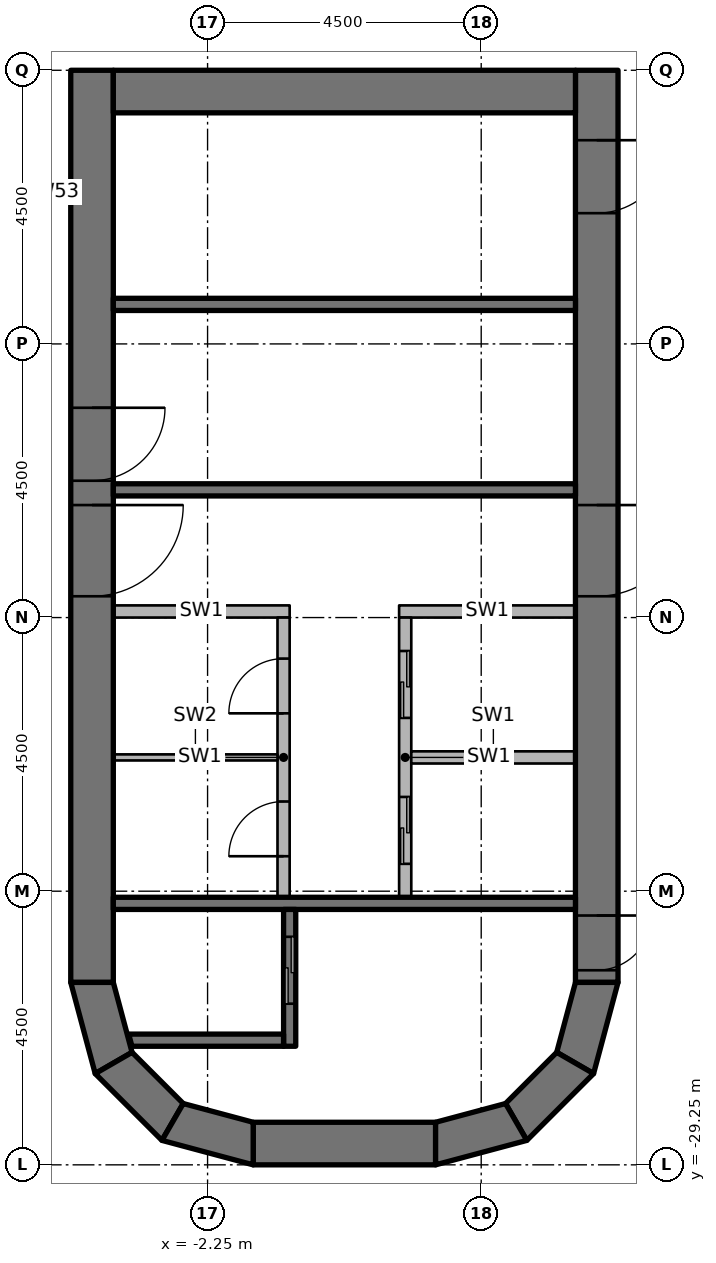
"""IFC4 building model, lengths in metres.
Left out: names, types, materials, properties, quantities, classifications, styles, units other than length and angle.
Written with IfcOpenShell. Run it as: python <this file> out.ifc"""

import sys

from ifc_helpers import new_model, si_unit, direction, frame, frame_2d, origin, place, context, subcontext, project, spatial, polyline, rectangle, outline, extrude, element, fill, save


model = new_model("IFC4")
c1 = context("Model", 3, precision=1e-05, world=origin(), true_north=direction((0.0, 1.0)))
c2 = subcontext(c1, "Body", "Model", "MODEL_VIEW")
j1 = project(units=[si_unit("LENGTHUNIT", "METRE"), si_unit("PLANEANGLEUNIT", "RADIAN")], contexts=[c1])
p1 = place(None, origin())
s1 = spatial("IfcSite", under=j1, at=p1, CompositionType="ELEMENT")
p2 = place(p1, origin())
s2 = spatial("IfcBuilding", under=s1, at=p2, CompositionType="ELEMENT")
p3 = place(p2, frame((0.0, 0.0, 190.4)))
s3 = spatial("IfcBuildingStorey", under=s2, at=p3, CompositionType="ELEMENT", Elevation=190.4)
p4 = place(p3, frame((-4.15, -11.25, 0.0), z_axis=(0.0, 0.0, 1.0), x_axis=(0.0, -1.0, 0.0)))
e1 = element("IfcWall", 1, at=p4, inside=s3, PredefinedType="SHEAR", context=c2, shape_type="SweptSolid", body=[
    extrude(rectangle(XDim=15.0, YDim=0.7, at=frame_2d((7.5, 0.0))), origin(), (0.0, 0.0, 1.0), 5.0),
])
p5 = place(p4, frame((7.15, 0.0, 0.0)))
e2 = element("IfcOpeningElement", 2, at=p5, cuts=e1, PredefinedType="OPENING", context=c2, shape_type="SweptSolid", body=[
    extrude(rectangle(XDim=1.5, YDim=2.3, at=frame_2d((0.75, 1.15))), frame((0.0, 0.36, 0.0), z_axis=(0.0, -1.0, 0.0), x_axis=(1.0, 0.0, 0.0)), (0.0, 0.0, 1.0), 0.72),
])
p6 = place(p4, frame((5.55, 0.0, 0.0)))
e3 = element("IfcOpeningElement", 3, at=p6, cuts=e1, PredefinedType="OPENING", context=c2, shape_type="SweptSolid", body=[
    extrude(rectangle(XDim=1.2, YDim=2.1, at=frame_2d((0.6, 1.05))), frame((0.0, 0.36, 0.0), z_axis=(0.0, -1.0, 0.0), x_axis=(1.0, 0.0, 0.0)), (0.0, 0.0, 1.0), 0.72),
])
p7 = place(p3, frame((4.15, -11.25, 0.0), z_axis=(0.0, 0.0, 1.0), x_axis=(0.0, -1.0, 0.0)))
e4 = element("IfcWall", 4, at=p7, inside=s3, PredefinedType="SHEAR", context=c2, shape_type="SweptSolid", body=[
    extrude(rectangle(XDim=15.0, YDim=0.7, at=frame_2d((7.5, 0.0))), origin(), (0.0, 0.0, 1.0), 5.0),
])
p8 = place(p7, frame((7.15, 0.0, 0.0)))
e5 = element("IfcOpeningElement", 5, at=p8, cuts=e4, PredefinedType="OPENING", context=c2, shape_type="SweptSolid", body=[
    extrude(rectangle(XDim=1.5, YDim=2.3, at=frame_2d((0.75, 1.15))), frame((0.0, 0.36, 0.0), z_axis=(0.0, -1.0, 0.0), x_axis=(1.0, 0.0, 0.0)), (0.0, 0.0, 1.0), 0.72),
])
p9 = place(p7, frame((13.9, 0.0, 0.0)))
e6 = element("IfcOpeningElement", 6, at=p9, cuts=e4, PredefinedType="OPENING", context=c2, shape_type="SweptSolid", body=[
    extrude(rectangle(XDim=0.9, YDim=2.1, at=frame_2d((0.45, 1.05))), frame((0.0, 0.36, 0.0), z_axis=(0.0, -1.0, 0.0), x_axis=(1.0, 0.0, 0.0)), (0.0, 0.0, 1.0), 0.72),
])
p10 = place(p7, frame((1.15, 0.0, 0.0)))
e7 = element("IfcOpeningElement", 7, at=p10, cuts=e4, PredefinedType="OPENING", context=c2, shape_type="SweptSolid", body=[
    extrude(rectangle(XDim=1.2, YDim=2.1, at=frame_2d((0.6, 1.05))), frame((0.0, 0.36, 0.0), z_axis=(0.0, -1.0, 0.0), x_axis=(1.0, 0.0, 0.0)), (0.0, 0.0, 1.0), 0.72),
])
p11 = place(p3, frame((-3.8, -11.6, 0.0), z_axis=(0.0, 0.0, 1.0), x_axis=(1.0, 0.0, 0.0)))
e8 = element("IfcWall", 8, at=p11, inside=s3, PredefinedType="SHEAR", context=c2, shape_type="SweptSolid", body=[
    extrude(rectangle(XDim=7.6, YDim=0.7, at=frame_2d((3.8, 0.0))), origin(), (0.0, 0.0, 1.0), 5.0),
])
p12 = place(p3, frame((-1.5, -28.9, 0.0), z_axis=(0.0, 0.0, 1.0), x_axis=(1.0, 0.0, 0.0)))
e9 = element("IfcWall", 9, at=p12, inside=s3, PredefinedType="SHEAR", context=c2, shape_type="SweptSolid", body=[
    extrude(rectangle(XDim=3.0, YDim=0.7, at=frame_2d((1.5, 0.0))), origin(), (0.0, 0.0, 1.0), 5.0),
])
p13 = place(p3, origin())
e10 = element("IfcWall", 10, at=p13, inside=s3, PredefinedType="SHEAR", context=c2, shape_type="SweptSolid", body=[
    extrude(outline(polyline([(-4.5, -26.25), (-4.098, -27.75), (-3.492, -27.4), (-3.8, -26.25), (-4.5, -26.25)])), origin(), (0.0, 0.0, 1.0), 5.0),
])
p14 = place(p3, origin())
e11 = element("IfcWall", 11, at=p14, inside=s3, PredefinedType="SHEAR", context=c2, shape_type="SweptSolid", body=[
    extrude(outline(polyline([(-4.098, -27.75), (-3.0, -28.848), (-2.65, -28.242), (-3.492, -27.4), (-4.098, -27.75)])), origin(), (0.0, 0.0, 1.0), 5.0),
])
p15 = place(p3, origin())
e12 = element("IfcWall", 12, at=p15, inside=s3, PredefinedType="SHEAR", context=c2, shape_type="SweptSolid", body=[
    extrude(outline(polyline([(-3.0, -28.848), (-1.5, -29.25), (-1.5, -28.55), (-2.65, -28.242), (-3.0, -28.848)])), origin(), (0.0, 0.0, 1.0), 5.0),
])
p16 = place(p3, origin())
e13 = element("IfcWall", 13, at=p16, inside=s3, PredefinedType="SHEAR", context=c2, shape_type="SweptSolid", body=[
    extrude(outline(polyline([(4.5, -26.25), (4.098, -27.75), (3.492, -27.4), (3.8, -26.25), (4.5, -26.25)])), origin(), (0.0, 0.0, 1.0), 5.0),
])
p17 = place(p3, origin())
e14 = element("IfcWall", 14, at=p17, inside=s3, PredefinedType="SHEAR", context=c2, shape_type="SweptSolid", body=[
    extrude(outline(polyline([(4.098, -27.75), (3.0, -28.848), (2.65, -28.242), (3.492, -27.4), (4.098, -27.75)])), origin(), (0.0, 0.0, 1.0), 5.0),
])
p18 = place(p3, origin())
e15 = element("IfcWall", 15, at=p18, inside=s3, PredefinedType="SHEAR", context=c2, shape_type="SweptSolid", body=[
    extrude(outline(polyline([(3.0, -28.848), (1.5, -29.25), (1.5, -28.55), (2.65, -28.242), (3.0, -28.848)])), origin(), (0.0, 0.0, 1.0), 5.0),
])
p19 = place(p3, origin())
e16 = element("IfcWall", 16, at=p19, inside=s3, PredefinedType="SOLIDWALL", context=c2, shape_type="SweptSolid", body=[
    extrude(outline(polyline([(4.49, -30.879), (6.129, -29.24), (5.95, -29.136), (4.386, -30.7), (4.49, -30.879)])), origin(), (0.0, 0.0, 1.0), 4.85),
])
p20 = place(p3, origin())
e17 = element("IfcWall", 17, at=p20, inside=s3, PredefinedType="SOLIDWALL", context=c2, shape_type="SweptSolid", body=[
    extrude(outline(polyline([(-6.129, -29.24), (-4.49, -30.879), (-4.386, -30.7), (-5.95, -29.136), (-6.129, -29.24)])), origin(), (0.0, 0.0, 1.0), 4.85),
])
p21 = place(p3, frame((3.8, -24.95, 0.0), z_axis=(0.0, 0.0, 1.0), x_axis=(-1.0, 0.0, 0.0)))
e18 = element("IfcWall", 18, at=p21, inside=s3, PredefinedType="SHEAR", context=c2, shape_type="SweptSolid", body=[
    extrude(rectangle(XDim=7.6, YDim=0.2, at=frame_2d((3.8, 0.0))), origin(), (0.0, 0.0, 1.0), 4.85),
])
p22 = place(p3, frame((-0.9, -27.3, 0.0), z_axis=(0.0, 0.0, 1.0), x_axis=(0.0, 1.0, 0.0)))
e19 = element("IfcWall", 19, at=p22, inside=s3, PredefinedType="SHEAR", context=c2, shape_type="SweptSolid", body=[
    extrude(rectangle(XDim=2.25, YDim=0.2, at=frame_2d((1.125, 0.0))), origin(), (0.0, 0.0, 1.0), 4.85),
])
p23 = place(p22, frame((0.7, 0.0, 0.0)))
e20 = element("IfcOpeningElement", 20, at=p23, cuts=e19, PredefinedType="OPENING", context=c2, shape_type="SweptSolid", body=[
    extrude(rectangle(XDim=1.1, YDim=2.3, at=frame_2d((0.55, 1.15))), frame((0.0, 0.11, 0.0), z_axis=(0.0, -1.0, 0.0), x_axis=(1.0, 0.0, 0.0)), (0.0, 0.0, 1.0), 0.22),
])
p24 = place(p3, origin())
e21 = element("IfcWall", 21, at=p24, inside=s3, PredefinedType="SHEAR", context=c2, shape_type="SweptSolid", body=[
    extrude(outline(polyline([(-1.0, -27.1), (-3.548, -27.1), (-3.494, -27.3), (-1.0, -27.3), (-1.0, -27.1)])), origin(), (0.0, 0.0, 1.0), 4.85),
])
for number, where, z_axis, x_axis in (
    (22, (3.8, -18.15, 0.0), (0.0, 0.0, 1.0), (-1.0, 0.0, 0.0)),
    (23, (3.8, -15.1, 0.0), (0.0, 0.0, 1.0), (-1.0, 0.0, 0.0)),
):
    element("IfcWall", number, at=place(p3, frame(where, z_axis=z_axis, x_axis=x_axis)), inside=s3, PredefinedType="SHEAR", context=c2, shape_type="SweptSolid", body=[
        extrude(rectangle(XDim=7.6, YDim=0.2, at=frame_2d((3.8, 0.0))), origin(), (0.0, 0.0, 1.0), 4.85),
    ])
p25 = place(p3, frame((3.8, -20.15, 0.0), z_axis=(0.0, 0.0, 1.0), x_axis=(-1.0, 0.0, 0.0)))
e24 = element("IfcWall", 24, at=p25, inside=s3, PredefinedType="PARTITIONING", context=c2, shape_type="SweptSolid", body=[
    extrude(rectangle(XDim=2.9, YDim=0.2, at=frame_2d((1.45, 0.0))), origin(), (0.0, 0.0, 1.0), 4.85),
])
p26 = place(p3, frame((1.0, -24.85, 0.0), z_axis=(0.0, 0.0, 1.0), x_axis=(0.0, 1.0, 0.0)))
e25 = element("IfcWall", 25, at=p26, inside=s3, PredefinedType="PARTITIONING", context=c2, shape_type="SweptSolid", body=[
    extrude(rectangle(XDim=4.6, YDim=0.2, at=frame_2d((2.3, 0.0))), origin(), (0.0, 0.0, 1.0), 4.85),
])
p27 = place(p26, frame((0.55, 0.0, 0.0)))
e26 = element("IfcOpeningElement", 26, at=p27, cuts=e25, PredefinedType="OPENING", context=c2, shape_type="SweptSolid", body=[
    extrude(rectangle(XDim=1.1, YDim=2.3, at=frame_2d((0.55, 1.15))), frame((0.0, 0.11, 0.0), z_axis=(0.0, -1.0, 0.0), x_axis=(1.0, 0.0, 0.0)), (0.0, 0.0, 1.0), 0.22),
])
p28 = place(p26, frame((2.95, 0.0, 0.0)))
e27 = element("IfcOpeningElement", 27, at=p28, cuts=e25, PredefinedType="OPENING", context=c2, shape_type="SweptSolid", body=[
    extrude(rectangle(XDim=1.1, YDim=2.3, at=frame_2d((0.55, 1.15))), frame((0.0, 0.11, 0.0), z_axis=(0.0, -1.0, 0.0), x_axis=(1.0, 0.0, 0.0)), (0.0, 0.0, 1.0), 0.22),
])
p29 = place(p3, frame((-0.9, -20.15, 0.0), z_axis=(0.0, 0.0, 1.0), x_axis=(-1.0, 0.0, 0.0)))
e28 = element("IfcWall", 28, at=p29, inside=s3, PredefinedType="PARTITIONING", context=c2, shape_type="SweptSolid", body=[
    extrude(rectangle(XDim=2.9, YDim=0.2, at=frame_2d((1.45, 0.0))), origin(), (0.0, 0.0, 1.0), 4.85),
])
p30 = place(p3, frame((-1.0, -24.85, 0.0), z_axis=(0.0, 0.0, 1.0), x_axis=(0.0, 1.0, 0.0)))
e29 = element("IfcWall", 29, at=p30, inside=s3, PredefinedType="PARTITIONING", context=c2, shape_type="SweptSolid", body=[
    extrude(rectangle(XDim=4.6, YDim=0.2, at=frame_2d((2.3, 0.0))), origin(), (0.0, 0.0, 1.0), 4.85),
])
p31 = place(p30, frame((0.675, 0.0, 0.0)))
e30 = element("IfcOpeningElement", 30, at=p31, cuts=e29, PredefinedType="OPENING", context=c2, shape_type="SweptSolid", body=[
    extrude(rectangle(XDim=0.9, YDim=2.1, at=frame_2d((0.45, 1.05))), frame((0.0, 0.11, 0.0), z_axis=(0.0, -1.0, 0.0), x_axis=(1.0, 0.0, 0.0)), (0.0, 0.0, 1.0), 0.22),
])
p32 = place(p30, frame((3.025, 0.0, 0.0)))
e31 = element("IfcOpeningElement", 31, at=p32, cuts=e29, PredefinedType="OPENING", context=c2, shape_type="SweptSolid", body=[
    extrude(rectangle(XDim=0.9, YDim=2.1, at=frame_2d((0.45, 1.05))), frame((0.0, 0.11, 0.0), z_axis=(0.0, -1.0, 0.0), x_axis=(1.0, 0.0, 0.0)), (0.0, 0.0, 1.0), 0.22),
])
p33 = place(p3, frame((3.8, -22.55, 0.0), z_axis=(0.0, 0.0, 1.0), x_axis=(-1.0, 0.0, 0.0)))
e32 = element("IfcWall", 32, at=p33, inside=s3, PredefinedType="PARTITIONING", context=c2, shape_type="SweptSolid", body=[
    extrude(rectangle(XDim=2.7, YDim=0.2, at=frame_2d((1.35, 0.0))), origin(), (0.0, 0.0, 1.0), 4.85),
])
p34 = place(p3, frame((-1.1, -22.55, 0.0), z_axis=(0.0, 0.0, 1.0), x_axis=(-1.0, 0.0, 0.0)))
e33 = element("IfcWall", 33, at=p34, inside=s3, PredefinedType="PARTITIONING", context=c2, shape_type="SweptSolid", body=[
    extrude(rectangle(XDim=2.7, YDim=0.1, at=frame_2d((1.35, 0.0))), origin(), (0.0, 0.0, 1.0), 4.85),
])
p35 = place(p8, origin())
e34 = element("IfcDoor", 34, at=p35, inside=s3, OperationType="DOUBLE_DOOR_SINGLE_SWING", PredefinedType="DOOR", context=c2, shape_type="SweptSolid", body=[
    extrude(rectangle(XDim=1.5, YDim=2.3, at=frame_2d((0.75, 1.15))), frame((0.0, 0.025, 0.0), z_axis=(0.0, -1.0, 0.0), x_axis=(1.0, 0.0, 0.0)), (0.0, 0.0, 1.0), 0.05),
])
fill(e5, e34)
p36 = place(p5, origin())
e35 = element("IfcDoor", 35, at=p36, inside=s3, OperationType="DOUBLE_DOOR_SINGLE_SWING", PredefinedType="DOOR", context=c2, shape_type="SweptSolid", body=[
    extrude(rectangle(XDim=1.5, YDim=2.3, at=frame_2d((0.75, 1.15))), frame((0.0, 0.025, 0.0), z_axis=(0.0, -1.0, 0.0), x_axis=(1.0, 0.0, 0.0)), (0.0, 0.0, 1.0), 0.05),
])
fill(e2, e35)
p37 = place(p9, origin())
e36 = element("IfcDoor", 36, at=p37, inside=s3, OperationType="SINGLE_SWING_RIGHT", PredefinedType="DOOR", context=c2, shape_type="SweptSolid", body=[
    extrude(rectangle(XDim=0.9, YDim=2.1, at=frame_2d((0.45, 1.05))), frame((0.0, 0.025, 0.0), z_axis=(0.0, -1.0, 0.0), x_axis=(1.0, 0.0, 0.0)), (0.0, 0.0, 1.0), 0.05),
])
fill(e6, e36)
p38 = place(p6, origin())
e37 = element("IfcDoor", 37, at=p38, inside=s3, OperationType="SINGLE_SWING_RIGHT", PredefinedType="DOOR", context=c2, shape_type="SweptSolid", body=[
    extrude(rectangle(XDim=1.2, YDim=2.1, at=frame_2d((0.6, 1.05))), frame((0.0, 0.025, 0.0), z_axis=(0.0, -1.0, 0.0), x_axis=(1.0, 0.0, 0.0)), (0.0, 0.0, 1.0), 0.05),
])
fill(e3, e37)
p39 = place(p10, origin())
e38 = element("IfcDoor", 38, at=p39, inside=s3, OperationType="SINGLE_SWING_LEFT", PredefinedType="DOOR", context=c2, shape_type="SweptSolid", body=[
    extrude(rectangle(XDim=1.2, YDim=2.1, at=frame_2d((0.6, 1.05))), frame((0.0, 0.025, 0.0), z_axis=(0.0, -1.0, 0.0), x_axis=(1.0, 0.0, 0.0)), (0.0, 0.0, 1.0), 0.05),
])
fill(e7, e38)
p40 = place(p23, origin())
e39 = element("IfcDoor", 39, at=p40, inside=s3, OperationType="DOUBLE_DOOR_SLIDING", PredefinedType="DOOR", context=c2, shape_type="SweptSolid", body=[
    extrude(rectangle(XDim=1.1, YDim=2.3, at=frame_2d((0.55, 1.15))), frame((0.0, 0.025, 0.0), z_axis=(0.0, -1.0, 0.0), x_axis=(1.0, 0.0, 0.0)), (0.0, 0.0, 1.0), 0.05),
])
fill(e20, e39)
p41 = place(p27, origin())
e40 = element("IfcDoor", 40, at=p41, inside=s3, OperationType="DOUBLE_DOOR_SLIDING", PredefinedType="DOOR", context=c2, shape_type="SweptSolid", body=[
    extrude(rectangle(XDim=1.1, YDim=2.3, at=frame_2d((0.55, 1.15))), frame((0.0, 0.025, 0.0), z_axis=(0.0, -1.0, 0.0), x_axis=(1.0, 0.0, 0.0)), (0.0, 0.0, 1.0), 0.05),
])
fill(e26, e40)
p42 = place(p28, origin())
e41 = element("IfcDoor", 41, at=p42, inside=s3, OperationType="DOUBLE_DOOR_SLIDING", PredefinedType="DOOR", context=c2, shape_type="SweptSolid", body=[
    extrude(rectangle(XDim=1.1, YDim=2.3, at=frame_2d((0.55, 1.15))), frame((0.0, 0.025, 0.0), z_axis=(0.0, -1.0, 0.0), x_axis=(1.0, 0.0, 0.0)), (0.0, 0.0, 1.0), 0.05),
])
fill(e27, e41)
p43 = place(p31, origin())
e42 = element("IfcDoor", 42, at=p43, inside=s3, OperationType="SINGLE_SWING_RIGHT", PredefinedType="DOOR", context=c2, shape_type="SweptSolid", body=[
    extrude(rectangle(XDim=0.9, YDim=2.1, at=frame_2d((0.45, 1.05))), frame((0.0, 0.025, 0.0), z_axis=(0.0, -1.0, 0.0), x_axis=(1.0, 0.0, 0.0)), (0.0, 0.0, 1.0), 0.05),
])
fill(e30, e42)
p44 = place(p32, origin())
e43 = element("IfcDoor", 43, at=p44, inside=s3, OperationType="SINGLE_SWING_LEFT", PredefinedType="DOOR", context=c2, shape_type="SweptSolid", body=[
    extrude(rectangle(XDim=0.9, YDim=2.1, at=frame_2d((0.45, 1.05))), frame((0.0, 0.025, 0.0), z_axis=(0.0, -1.0, 0.0), x_axis=(1.0, 0.0, 0.0)), (0.0, 0.0, 1.0), 0.05),
])
fill(e31, e43)
save(model, sys.argv[1])
